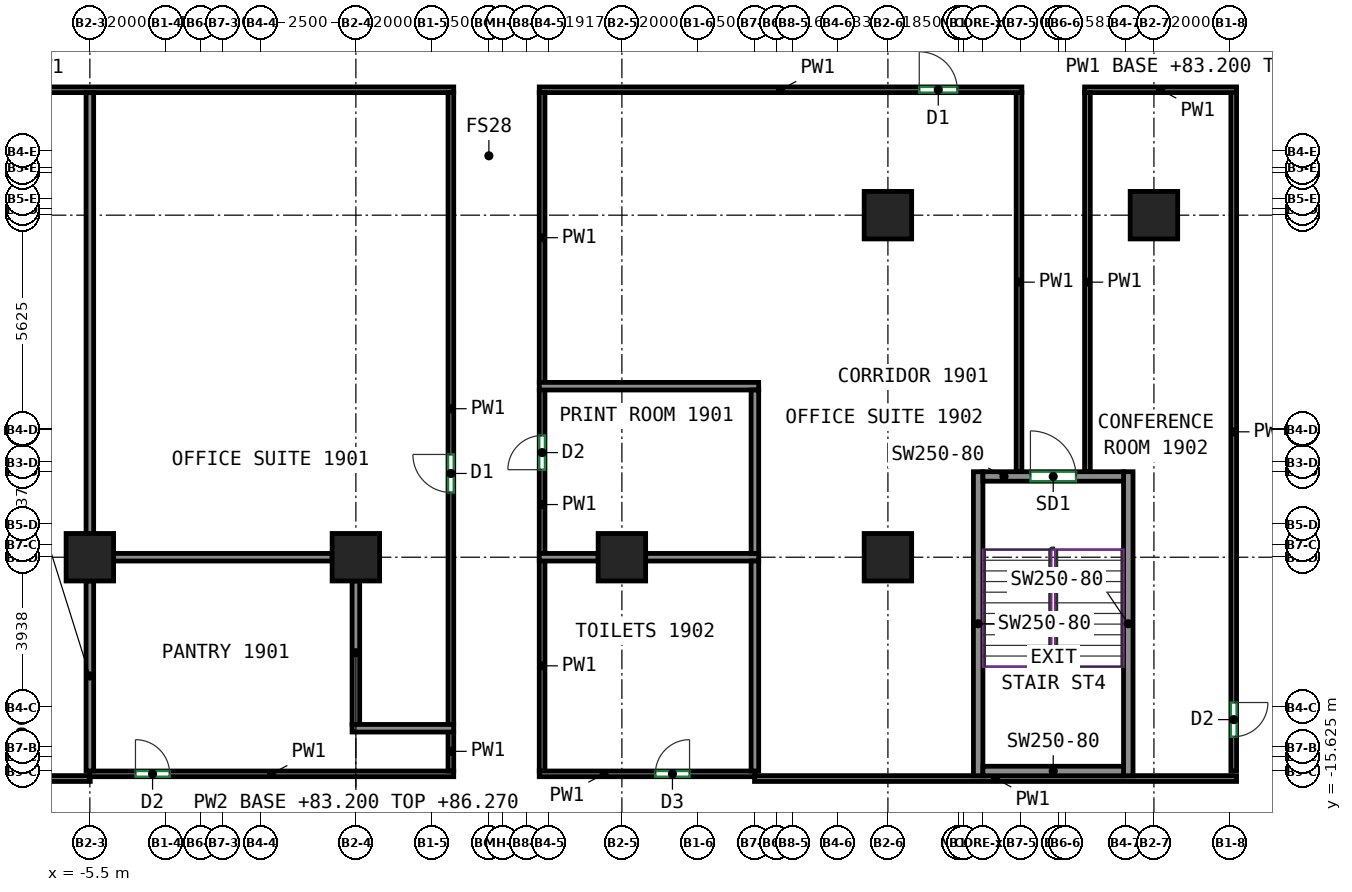
"""IFC4 building model, lengths in metres.
Left out: names, types, materials, properties, quantities, classifications, styles, units other than length and angle.
Written with IfcOpenShell. Run it as: python <this file> out.ifc"""

import sys

from ifc_helpers import new_model, si_unit, direction, frame, frame_2d, origin, origin_2d, place, context, subcontext, project, spatial, rectangle, extrude, source, transform, mapped, element, fill, save


model = new_model("IFC4")
c1 = context("Model", 3, precision=1e-05, world=origin(), true_north=direction((0.0, 1.0)))
c2 = subcontext(c1, "Body", "Model", "MODEL_VIEW")
j1 = project(units=[si_unit("LENGTHUNIT", "METRE"), si_unit("PLANEANGLEUNIT", "RADIAN")], contexts=[c1])
p1 = place(None, origin())
s1 = spatial("IfcSite", under=j1, at=p1, CompositionType="ELEMENT")
p2 = place(p1, origin())
s2 = spatial("IfcBuilding", under=s1, at=p2, CompositionType="ELEMENT")
p3 = place(p2, frame((0.0, 0.0, 83.2)))
s3 = spatial("IfcBuildingStorey", under=s2, at=p3, CompositionType="ELEMENT", Elevation=83.2)
m1 = source(origin(), c2, "Body", "SweptSolid", [
    extrude(rectangle(XDim=1.25, YDim=1.25, at=origin_2d()), origin(), (0.0, 0.0, 1.0), 3.72),
])
for number, where, z_axis, x_axis in (
    (1, (-5.5, -10.0, 0.0), (0.0, 0.0, 1.0), (1.0, 0.0, 0.0)),
    (2, (1.5, -10.0, 0.0), (0.0, 0.0, 1.0), (1.0, 0.0, 0.0)),
    (3, (8.5, -10.0, 0.0), (0.0, 0.0, 1.0), (1.0, 0.0, 0.0)),
    (4, (15.5, -10.0, 0.0), (0.0, 0.0, 1.0), (1.0, 0.0, 0.0)),
    (5, (15.5, -1.0, 0.0), (0.0, 0.0, 1.0), (1.0, 0.0, 0.0)),
    (6, (22.5, -1.0, 0.0), (0.0, 0.0, 1.0), (1.0, 0.0, 0.0)),
):
    element("IfcColumn", number, at=place(p3, frame(where, z_axis=z_axis, x_axis=x_axis)), inside=s3, PredefinedType="COLUMN", context=c2, shape_type="MappedRepresentation", body=[
        mapped(m1, transform((0.0, 0.0, 0.0))),
    ])
m2 = source(origin(), c2, "Body", "SweptSolid", [
    extrude(rectangle(XDim=8.0, YDim=0.25, at=frame_2d((4.0, 0.0))), origin(), (0.0, 0.0, 1.0), 3.72),
])
for number, where, z_axis, x_axis in (
    (7, (17.875, -15.75, 0.0), (0.0, 0.0, 1.0), (0.0, 1.0, 0.0)),
    (8, (21.825, -15.75, 0.0), (0.0, 0.0, 1.0), (0.0, 1.0, 0.0)),
):
    element("IfcWall", number, at=place(p3, frame(where, z_axis=z_axis, x_axis=x_axis)), inside=s3, PredefinedType="SHEAR", context=c2, shape_type="MappedRepresentation", body=[
        mapped(m2, transform((0.0, 0.0, 0.0))),
    ])
m3 = source(origin(), c2, "Body", "SweptSolid", [
    extrude(rectangle(XDim=3.7, YDim=0.25, at=frame_2d((1.85, 0.0))), origin(), (0.0, 0.0, 1.0), 3.72),
])
p4 = place(p3, frame((18.0, -15.625, 0.0), z_axis=(0.0, 0.0, 1.0), x_axis=(1.0, 0.0, 0.0)))
e9 = element("IfcWall", 9, at=p4, inside=s3, PredefinedType="SHEAR", context=c2, shape_type="MappedRepresentation", body=[
    mapped(m3, transform((0.0, 0.0, 0.0))),
])
p5 = place(p3, frame((18.0, -7.875, 0.0), z_axis=(0.0, 0.0, 1.0), x_axis=(1.0, 0.0, 0.0)))
e10 = element("IfcWall", 10, at=p5, inside=s3, PredefinedType="SHEAR", context=c2, shape_type="MappedRepresentation", body=[
    mapped(m3, transform((0.0, 0.0, 0.0))),
])
p6 = place(p5, frame((1.25, 0.0, 0.0)))
e11 = element("IfcOpeningElement", 11, at=p6, cuts=e10, PredefinedType="OPENING", context=c2, shape_type="SweptSolid", body=[
    extrude(rectangle(XDim=1.2, YDim=2.1, at=frame_2d((0.6, 1.05))), frame((0.0, 0.135, 0.0), z_axis=(0.0, -1.0, 0.0), x_axis=(1.0, 0.0, 0.0)), (0.0, 0.0, 1.0), 0.27),
])
p7 = place(p3, frame((-14.9, -15.825, 0.0), z_axis=(0.0, 0.0, 1.0), x_axis=(1.0, 0.0, 0.0)))
e12 = element("IfcWall", 12, at=p7, inside=s3, PredefinedType="PARTITIONING", context=c2, shape_type="SweptSolid", body=[
    extrude(rectangle(XDim=9.41, YDim=0.15, at=frame_2d((4.705, 0.0))), origin(), (0.0, 0.0, 1.0), 3.72),
])
p8 = place(p3, frame((-19.325, 2.3, 0.0), z_axis=(0.0, 0.0, 1.0), x_axis=(1.0, 0.0, 0.0)))
e13 = element("IfcWall", 13, at=p8, inside=s3, PredefinedType="PARTITIONING", context=c2, shape_type="SweptSolid", body=[
    extrude(rectangle(XDim=23.4, YDim=0.15, at=frame_2d((11.7, 0.0))), origin(), (0.0, 0.0, 1.0), 3.72),
])
p9 = place(p8, frame((8.726, 0.0, 0.0)))
e14 = element("IfcOpeningElement", 14, at=p9, cuts=e13, PredefinedType="OPENING", context=c2, shape_type="SweptSolid", body=[
    extrude(rectangle(XDim=1.8, YDim=2.1, at=frame_2d((0.9, 1.05))), frame((0.0, 0.085, 0.0), z_axis=(0.0, -1.0, 0.0), x_axis=(1.0, 0.0, 0.0)), (0.0, 0.0, 1.0), 0.17),
])
p10 = place(p3, frame((-5.51, -15.7, 0.0), z_axis=(0.0, 0.0, 1.0), x_axis=(1.0, 0.0, 0.0)))
e15 = element("IfcWall", 15, at=p10, inside=s3, PredefinedType="PARTITIONING", context=c2, shape_type="SweptSolid", body=[
    extrude(rectangle(XDim=9.585, YDim=0.15, at=frame_2d((4.792, 0.0))), origin(), (0.0, 0.0, 1.0), 3.72),
])
p11 = place(p10, frame((1.21, 0.0, 0.0)))
e16 = element("IfcOpeningElement", 16, at=p11, cuts=e15, PredefinedType="OPENING", context=c2, shape_type="SweptSolid", body=[
    extrude(rectangle(XDim=0.9, YDim=2.1, at=frame_2d((0.45, 1.05))), frame((0.0, 0.085, 0.0), z_axis=(0.0, -1.0, 0.0), x_axis=(1.0, 0.0, 0.0)), (0.0, 0.0, 1.0), 0.17),
])
p12 = place(p3, frame((4.0, -15.625, 0.0), z_axis=(0.0, 0.0, 1.0), x_axis=(0.0, 1.0, 0.0)))
e17 = element("IfcWall", 17, at=p12, inside=s3, PredefinedType="PARTITIONING", context=c2, shape_type="SweptSolid", body=[
    extrude(rectangle(XDim=1.035, YDim=0.15, at=frame_2d((0.518, 0.0))), origin(), (0.0, 0.0, 1.0), 3.72),
])
p13 = place(p3, frame((4.0, -14.41, 0.0), z_axis=(0.0, 0.0, 1.0), x_axis=(0.0, 1.0, 0.0)))
e18 = element("IfcWall", 18, at=p13, inside=s3, PredefinedType="PARTITIONING", context=c2, shape_type="SweptSolid", body=[
    extrude(rectangle(XDim=16.635, YDim=0.15, at=frame_2d((8.317, 0.0))), origin(), (0.0, 0.0, 1.0), 3.72),
])
p14 = place(p13, frame((6.114, 0.0, 0.0)))
e19 = element("IfcOpeningElement", 19, at=p14, cuts=e18, PredefinedType="OPENING", context=c2, shape_type="SweptSolid", body=[
    extrude(rectangle(XDim=1.0, YDim=2.1, at=frame_2d((0.5, 1.05))), frame((0.0, 0.085, 0.0), z_axis=(0.0, -1.0, 0.0), x_axis=(1.0, 0.0, 0.0)), (0.0, 0.0, 1.0), 0.17),
])
p15 = place(p3, frame((6.4, -15.625, 0.0), z_axis=(0.0, 0.0, 1.0), x_axis=(0.0, 1.0, 0.0)))
e20 = element("IfcWall", 20, at=p15, inside=s3, PredefinedType="PARTITIONING", context=c2, shape_type="SweptSolid", body=[
    extrude(rectangle(XDim=5.535, YDim=0.15, at=frame_2d((2.768, 0.0))), origin(), (0.0, 0.0, 1.0), 3.72),
])
p16 = place(p3, frame((6.325, -15.7, 0.0), z_axis=(0.0, 0.0, 1.0), x_axis=(1.0, 0.0, 0.0)))
e21 = element("IfcWall", 21, at=p16, inside=s3, PredefinedType="PARTITIONING", context=c2, shape_type="SweptSolid", body=[
    extrude(rectangle(XDim=5.685, YDim=0.15, at=frame_2d((2.843, 0.0))), origin(), (0.0, 0.0, 1.0), 3.72),
])
p17 = place(p16, frame((3.055, 0.0, 0.0)))
e22 = element("IfcOpeningElement", 22, at=p17, cuts=e21, PredefinedType="OPENING", context=c2, shape_type="SweptSolid", body=[
    extrude(rectangle(XDim=0.9, YDim=2.1, at=frame_2d((0.45, 1.05))), frame((0.0, 0.085, 0.0), z_axis=(0.0, -1.0, 0.0), x_axis=(1.0, 0.0, 0.0)), (0.0, 0.0, 1.0), 0.17),
])
p18 = place(p3, frame((6.4, -9.91, 0.0), z_axis=(0.0, 0.0, 1.0), x_axis=(0.0, 1.0, 0.0)))
e23 = element("IfcWall", 23, at=p18, inside=s3, PredefinedType="PARTITIONING", context=c2, shape_type="SweptSolid", body=[
    extrude(rectangle(XDim=4.32, YDim=0.15, at=frame_2d((2.16, 0.0))), origin(), (0.0, 0.0, 1.0), 3.72),
])
p19 = place(p18, frame((2.213, 0.0, 0.0)))
e24 = element("IfcOpeningElement", 24, at=p19, cuts=e23, PredefinedType="OPENING", context=c2, shape_type="SweptSolid", body=[
    extrude(rectangle(XDim=0.9, YDim=2.1, at=frame_2d((0.45, 1.05))), frame((0.0, 0.085, 0.0), z_axis=(0.0, -1.0, 0.0), x_axis=(1.0, 0.0, 0.0)), (0.0, 0.0, 1.0), 0.17),
])
p20 = place(p3, frame((18.95, 2.225, 0.0), z_axis=(0.0, 0.0, 1.0), x_axis=(0.0, -1.0, 0.0)))
e25 = element("IfcWall", 25, at=p20, inside=s3, PredefinedType="PARTITIONING", context=c2, shape_type="SweptSolid", body=[
    extrude(rectangle(XDim=9.975, YDim=0.15, at=frame_2d((4.988, 0.0))), origin(), (0.0, 0.0, 1.0), 3.72),
])
p21 = place(p3, frame((6.325, 2.3, 0.0), z_axis=(0.0, 0.0, 1.0), x_axis=(1.0, 0.0, 0.0)))
e26 = element("IfcWall", 26, at=p21, inside=s3, PredefinedType="PARTITIONING", context=c2, shape_type="SweptSolid", body=[
    extrude(rectangle(XDim=12.7, YDim=0.15, at=frame_2d((6.35, 0.0))), origin(), (0.0, 0.0, 1.0), 3.72),
])
p22 = place(p21, frame((10.0, 0.0, 0.0)))
e27 = element("IfcOpeningElement", 27, at=p22, cuts=e26, PredefinedType="OPENING", context=c2, shape_type="SweptSolid", body=[
    extrude(rectangle(XDim=1.0, YDim=2.1, at=frame_2d((0.5, 1.05))), frame((0.0, 0.085, 0.0), z_axis=(0.0, -1.0, 0.0), x_axis=(1.0, 0.0, 0.0)), (0.0, 0.0, 1.0), 0.17),
])
p23 = place(p3, frame((6.4, -5.41, 0.0), z_axis=(0.0, 0.0, 1.0), x_axis=(0.0, 1.0, 0.0)))
e28 = element("IfcWall", 28, at=p23, inside=s3, PredefinedType="PARTITIONING", context=c2, shape_type="SweptSolid", body=[
    extrude(rectangle(XDim=7.635, YDim=0.15, at=frame_2d((3.817, 0.0))), origin(), (0.0, 0.0, 1.0), 3.72),
])
p24 = place(p3, frame((11.99, -15.825, 0.0), z_axis=(0.0, 0.0, 1.0), x_axis=(1.0, 0.0, 0.0)))
e29 = element("IfcWall", 29, at=p24, inside=s3, PredefinedType="PARTITIONING", context=c2, shape_type="SweptSolid", body=[
    extrude(rectangle(XDim=12.685, YDim=0.15, at=frame_2d((6.343, 0.0))), origin(), (0.0, 0.0, 1.0), 3.72),
])
p25 = place(p3, frame((24.6, 2.225, 0.0), z_axis=(0.0, 0.0, 1.0), x_axis=(0.0, -1.0, 0.0)))
e30 = element("IfcWall", 30, at=p25, inside=s3, PredefinedType="PARTITIONING", context=c2, shape_type="SweptSolid", body=[
    extrude(rectangle(XDim=17.85, YDim=0.15, at=frame_2d((8.925, 0.0))), origin(), (0.0, 0.0, 1.0), 3.72),
])
p26 = place(p25, frame((16.048, 0.0, 0.0)))
e31 = element("IfcOpeningElement", 31, at=p26, cuts=e30, PredefinedType="OPENING", context=c2, shape_type="SweptSolid", body=[
    extrude(rectangle(XDim=0.9, YDim=2.1, at=frame_2d((0.45, 1.05))), frame((0.0, 0.085, 0.0), z_axis=(0.0, -1.0, 0.0), x_axis=(1.0, 0.0, 0.0)), (0.0, 0.0, 1.0), 0.17),
])
p27 = place(p3, frame((20.675, 2.3, 0.0), z_axis=(0.0, 0.0, 1.0), x_axis=(1.0, 0.0, 0.0)))
e32 = element("IfcWall", 32, at=p27, inside=s3, PredefinedType="PARTITIONING", context=c2, shape_type="SweptSolid", body=[
    extrude(rectangle(XDim=4.0, YDim=0.15, at=frame_2d((2.0, 0.0))), origin(), (0.0, 0.0, 1.0), 3.72),
])
p28 = place(p3, frame((20.75, -7.75, 0.0), z_axis=(0.0, 0.0, 1.0), x_axis=(0.0, 1.0, 0.0)))
e33 = element("IfcWall", 33, at=p28, inside=s3, PredefinedType="PARTITIONING", context=c2, shape_type="SweptSolid", body=[
    extrude(rectangle(XDim=9.975, YDim=0.15, at=frame_2d((4.988, 0.0))), origin(), (0.0, 0.0, 1.0), 3.72),
])
p29 = place(p3, frame((-5.5, -15.624, 0.0), z_axis=(0.0, 0.0, 1.0), x_axis=(0.0, 1.0, 0.0)))
e34 = element("IfcWall", 34, at=p29, inside=s3, PredefinedType="PARTITIONING", context=c2, shape_type="SweptSolid", body=[
    extrude(rectangle(XDim=4.999, YDim=0.2, at=frame_2d((2.5, 0.0))), origin(), (0.0, 0.0, 1.0), 3.07),
])
p30 = place(p3, frame((-5.5, -9.375, 0.0), z_axis=(0.0, 0.0, 1.0), x_axis=(0.0, 1.0, 0.0)))
e35 = element("IfcWall", 35, at=p30, inside=s3, PredefinedType="PARTITIONING", context=c2, shape_type="SweptSolid", body=[
    extrude(rectangle(XDim=11.599, YDim=0.2, at=frame_2d((5.8, 0.0))), origin(), (0.0, 0.0, 1.0), 3.72),
])
p31 = place(p3, frame((-4.875, -10.0, 0.0), z_axis=(0.0, 0.0, 1.0), x_axis=(1.0, 0.0, 0.0)))
e36 = element("IfcWall", 36, at=p31, inside=s3, PredefinedType="PARTITIONING", context=c2, shape_type="SweptSolid", body=[
    extrude(rectangle(XDim=5.75, YDim=0.2, at=frame_2d((2.875, 0.0))), origin(), (0.0, 0.0, 1.0), 3.72),
])
p32 = place(p3, frame((1.5, -14.4, 0.0), z_axis=(0.0, 0.0, 1.0), x_axis=(0.0, 1.0, 0.0)))
e37 = element("IfcWall", 37, at=p32, inside=s3, PredefinedType="PARTITIONING", context=c2, shape_type="SweptSolid", body=[
    extrude(rectangle(XDim=3.775, YDim=0.2, at=frame_2d((1.887, 0.0))), origin(), (0.0, 0.0, 1.0), 3.07),
])
p33 = place(p3, frame((1.4, -14.5, 0.0), z_axis=(0.0, 0.0, 1.0), x_axis=(1.0, 0.0, 0.0)))
e38 = element("IfcWall", 38, at=p33, inside=s3, PredefinedType="PARTITIONING", context=c2, shape_type="SweptSolid", body=[
    extrude(rectangle(XDim=2.674, YDim=0.2, at=frame_2d((1.337, 0.0))), origin(), (0.0, 0.0, 1.0), 3.72),
])
p34 = place(p3, frame((6.326, -10.0, 0.0), z_axis=(0.0, 0.0, 1.0), x_axis=(1.0, 0.0, 0.0)))
e39 = element("IfcWall", 39, at=p34, inside=s3, PredefinedType="PARTITIONING", context=c2, shape_type="SweptSolid", body=[
    extrude(rectangle(XDim=1.549, YDim=0.2, at=frame_2d((0.774, 0.0))), origin(), (0.0, 0.0, 1.0), 3.72),
])
p35 = place(p3, frame((9.125, -10.0, 0.0), z_axis=(0.0, 0.0, 1.0), x_axis=(1.0, 0.0, 0.0)))
e40 = element("IfcWall", 40, at=p35, inside=s3, PredefinedType="PARTITIONING", context=c2, shape_type="SweptSolid", body=[
    extrude(rectangle(XDim=2.975, YDim=0.2, at=frame_2d((1.488, 0.0))), origin(), (0.0, 0.0, 1.0), 3.72),
])
p36 = place(p3, frame((12.0, -15.624, 0.0), z_axis=(0.0, 0.0, 1.0), x_axis=(0.0, 1.0, 0.0)))
e41 = element("IfcWall", 41, at=p36, inside=s3, PredefinedType="PARTITIONING", context=c2, shape_type="SweptSolid", body=[
    extrude(rectangle(XDim=5.524, YDim=0.2, at=frame_2d((2.762, 0.0))), origin(), (0.0, 0.0, 1.0), 3.72),
])
p37 = place(p3, frame((12.1, -5.5, 0.0), z_axis=(0.0, 0.0, 1.0), x_axis=(-1.0, 0.0, 0.0)))
e42 = element("IfcWall", 42, at=p37, inside=s3, PredefinedType="PARTITIONING", context=c2, shape_type="SweptSolid", body=[
    extrude(rectangle(XDim=5.774, YDim=0.2, at=frame_2d((2.887, 0.0))), origin(), (0.0, 0.0, 1.0), 3.72),
])
p38 = place(p3, frame((12.0, -9.9, 0.0), z_axis=(0.0, 0.0, 1.0), x_axis=(0.0, 1.0, 0.0)))
e43 = element("IfcWall", 43, at=p38, inside=s3, PredefinedType="PARTITIONING", context=c2, shape_type="SweptSolid", body=[
    extrude(rectangle(XDim=4.3, YDim=0.2, at=frame_2d((2.15, 0.0))), origin(), (0.0, 0.0, 1.0), 3.72),
])
p39 = place(p6, origin())
e44 = element("IfcDoor", 44, at=p39, inside=s3, OperationType="DOUBLE_DOOR_SINGLE_SWING", PredefinedType="DOOR", context=c2, shape_type="SweptSolid", body=[
    extrude(rectangle(XDim=1.2, YDim=2.1, at=frame_2d((0.6, 1.05))), frame((0.0, 0.025, 0.0), z_axis=(0.0, -1.0, 0.0), x_axis=(1.0, 0.0, 0.0)), (0.0, 0.0, 1.0), 0.05),
])
fill(e11, e44)
p40 = place(p11, origin())
e45 = element("IfcDoor", 45, at=p40, inside=s3, OperationType="SINGLE_SWING_LEFT", PredefinedType="DOOR", context=c2, shape_type="SweptSolid", body=[
    extrude(rectangle(XDim=0.9, YDim=2.1, at=frame_2d((0.45, 1.05))), frame((0.0, 0.025, 0.0), z_axis=(0.0, -1.0, 0.0), x_axis=(1.0, 0.0, 0.0)), (0.0, 0.0, 1.0), 0.05),
])
fill(e16, e45)
p41 = place(p17, origin())
e46 = element("IfcDoor", 46, at=p41, inside=s3, OperationType="SINGLE_SWING_RIGHT", PredefinedType="DOOR", context=c2, shape_type="SweptSolid", body=[
    extrude(rectangle(XDim=0.9, YDim=2.1, at=frame_2d((0.45, 1.05))), frame((0.0, 0.025, 0.0), z_axis=(0.0, -1.0, 0.0), x_axis=(1.0, 0.0, 0.0)), (0.0, 0.0, 1.0), 0.05),
])
fill(e22, e46)
p42 = place(p26, origin())
e47 = element("IfcDoor", 47, at=p42, inside=s3, OperationType="SINGLE_SWING_LEFT", PredefinedType="DOOR", context=c2, shape_type="SweptSolid", body=[
    extrude(rectangle(XDim=0.9, YDim=2.1, at=frame_2d((0.45, 1.05))), frame((0.0, 0.025, 0.0), z_axis=(0.0, -1.0, 0.0), x_axis=(1.0, 0.0, 0.0)), (0.0, 0.0, 1.0), 0.05),
])
fill(e31, e47)
p43 = place(p14, origin())
e48 = element("IfcDoor", 48, at=p43, inside=s3, OperationType="SINGLE_SWING_RIGHT", PredefinedType="DOOR", context=c2, shape_type="SweptSolid", body=[
    extrude(rectangle(XDim=1.0, YDim=2.1, at=frame_2d((0.5, 1.05))), frame((0.0, 0.025, 0.0), z_axis=(0.0, -1.0, 0.0), x_axis=(1.0, 0.0, 0.0)), (0.0, 0.0, 1.0), 0.05),
])
fill(e19, e48)
p44 = place(p19, origin())
e49 = element("IfcDoor", 49, at=p44, inside=s3, OperationType="SINGLE_SWING_LEFT", PredefinedType="DOOR", context=c2, shape_type="SweptSolid", body=[
    extrude(rectangle(XDim=0.9, YDim=2.1, at=frame_2d((0.45, 1.05))), frame((0.0, 0.025, 0.0), z_axis=(0.0, -1.0, 0.0), x_axis=(1.0, 0.0, 0.0)), (0.0, 0.0, 1.0), 0.05),
])
fill(e24, e49)
p45 = place(p22, origin())
e50 = element("IfcDoor", 50, at=p45, inside=s3, OperationType="SINGLE_SWING_LEFT", PredefinedType="DOOR", context=c2, shape_type="SweptSolid", body=[
    extrude(rectangle(XDim=1.0, YDim=2.1, at=frame_2d((0.5, 1.05))), frame((0.0, 0.025, 0.0), z_axis=(0.0, -1.0, 0.0), x_axis=(1.0, 0.0, 0.0)), (0.0, 0.0, 1.0), 0.05),
])
fill(e27, e50)
save(model, sys.argv[1])
